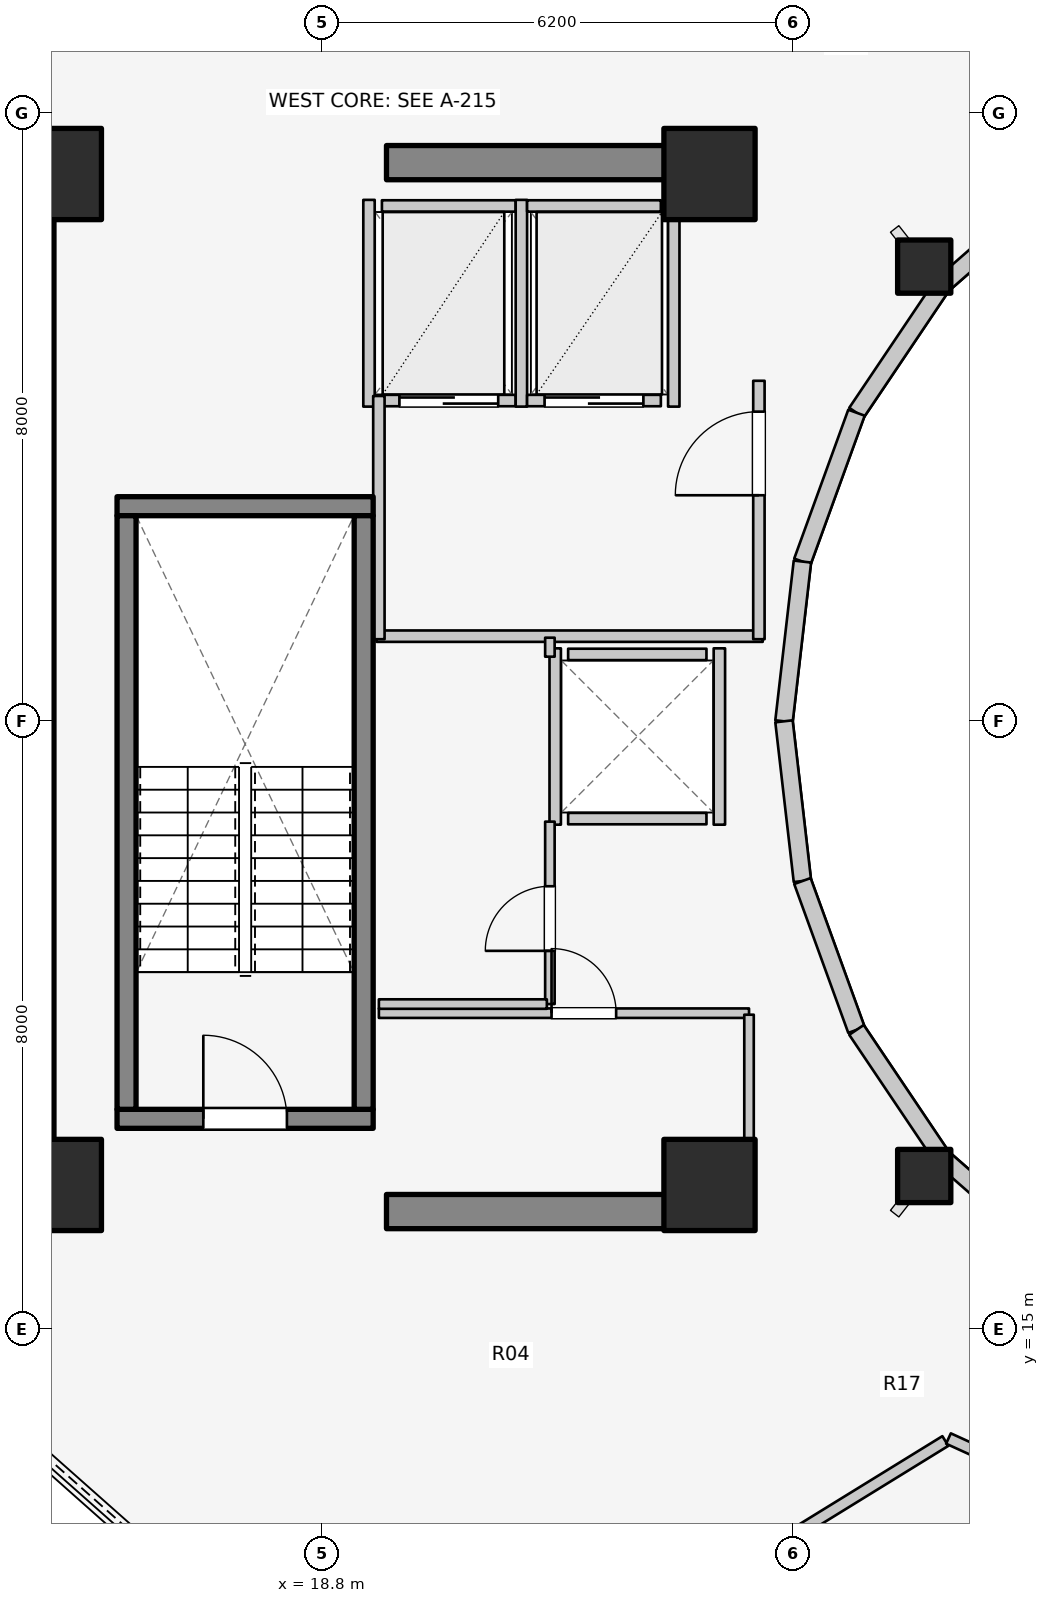
"""IFC4 building model, lengths in metres.
Left out: names, types, materials, properties, quantities, classifications, styles, units other than length and angle.
Written with IfcOpenShell. Run it as: python <this file> out.ifc"""

import sys

from ifc_helpers import new_model, si_unit, direction, frame, frame_2d, origin, origin_2d, place, context, subcontext, project, spatial, rectangle, extrude, element, fill, save


model = new_model("IFC4")
c1 = context("Model", 3, precision=1e-05, world=origin(), true_north=direction((0.0, 1.0)))
c2 = subcontext(c1, "Body", "Model", "MODEL_VIEW")
j1 = project(units=[si_unit("LENGTHUNIT", "METRE"), si_unit("PLANEANGLEUNIT", "RADIAN")], contexts=[c1])
p1 = place(None, origin())
s1 = spatial("IfcSite", under=j1, at=p1, CompositionType="ELEMENT")
p2 = place(p1, origin())
s2 = spatial("IfcBuilding", under=s1, at=p2, CompositionType="ELEMENT")
p3 = place(p2, frame((0.0, 0.0, 260.4)))
s3 = spatial("IfcBuildingStorey", under=s2, at=p3, CompositionType="ELEMENT", Elevation=260.4)
p4 = place(p3, frame((15.05, 17.05, 0.0), z_axis=(0.0, 0.0, 1.0), x_axis=(0.0, 1.0, 0.0)))
e1 = element("IfcWall", 1, at=p4, inside=s3, PredefinedType="SHEAR", context=c2, shape_type="SweptSolid", body=[
    extrude(rectangle(XDim=12.8, YDim=0.45, at=frame_2d((6.4, 0.0))), origin(), (0.0, 0.0, 1.0), 3.2),
])
for number, where, z_axis, x_axis in (
    (2, (19.65, 16.55, 0.0), (0.0, 0.0, 1.0), (1.0, 0.0, 0.0)),
    (3, (19.65, 30.35, 0.0), (0.0, 0.0, 1.0), (1.0, 0.0, 0.0)),
):
    element("IfcWall", number, at=place(p3, frame(where, z_axis=z_axis, x_axis=x_axis)), inside=s3, PredefinedType="SHEAR", context=c2, shape_type="SweptSolid", body=[
        extrude(rectangle(XDim=4.5, YDim=0.45, at=frame_2d((2.25, 0.0))), origin(), (0.0, 0.0, 1.0), 3.2),
    ])
p5 = place(p3, frame((16.105, 17.77, 0.0), z_axis=(0.0, 0.0, 1.0), x_axis=(1.0, 0.0, 0.0)))
e4 = element("IfcWall", 4, at=p5, inside=s3, PredefinedType="SOLIDWALL", context=c2, shape_type="SweptSolid", body=[
    extrude(rectangle(XDim=3.37, YDim=0.25, at=frame_2d((1.685, 0.0))), origin(), (0.0, 0.0, 1.0), 3.2),
])
p6 = place(p5, frame((1.135, 0.0, 0.0)))
e5 = element("IfcOpeningElement", 5, at=p6, cuts=e4, PredefinedType="OPENING", context=c2, shape_type="SweptSolid", body=[
    extrude(rectangle(XDim=1.1, YDim=2.1, at=frame_2d((0.55, 1.05))), frame((0.0, 0.135, 0.0), z_axis=(0.0, -1.0, 0.0), x_axis=(1.0, 0.0, 0.0)), (0.0, 0.0, 1.0), 0.27),
])
p7 = place(p3, frame((16.105, 25.83, 0.0), z_axis=(0.0, 0.0, 1.0), x_axis=(1.0, 0.0, 0.0)))
e6 = element("IfcWall", 6, at=p7, inside=s3, PredefinedType="SOLIDWALL", context=c2, shape_type="SweptSolid", body=[
    extrude(rectangle(XDim=3.37, YDim=0.25, at=frame_2d((1.685, 0.0))), origin(), (0.0, 0.0, 1.0), 3.2),
])
for number, where, z_axis, x_axis in (
    (7, (16.23, 17.895, 0.0), (0.0, 0.0, 1.0), (0.0, 1.0, 0.0)),
    (8, (19.35, 17.895, 0.0), (0.0, 0.0, 1.0), (0.0, 1.0, 0.0)),
):
    element("IfcWall", number, at=place(p3, frame(where, z_axis=z_axis, x_axis=x_axis)), inside=s3, PredefinedType="SOLIDWALL", context=c2, shape_type="SweptSolid", body=[
        extrude(rectangle(XDim=7.81, YDim=0.25, at=frame_2d((3.905, 0.0))), origin(), (0.0, 0.0, 1.0), 3.2),
    ])
for number, where, z_axis, x_axis in (
    (9, (15.3, 16.9, 0.0), (0.0, 0.0, 1.0), (1.0, 0.0, 0.0)),
    (10, (23.9, 16.9, 0.0), (0.0, 0.0, 1.0), (1.0, 0.0, 0.0)),
    (11, (23.9, 30.2, 0.0), (0.0, 0.0, 1.0), (1.0, 0.0, 0.0)),
    (12, (15.3, 30.2, 0.0), (0.0, 0.0, 1.0), (1.0, 0.0, 0.0)),
):
    element("IfcColumn", number, at=place(p3, frame(where, z_axis=z_axis, x_axis=x_axis)), inside=s3, PredefinedType="COLUMN", context=c2, shape_type="SweptSolid", body=[
        extrude(rectangle(XDim=1.2, YDim=1.2, at=origin_2d()), origin(), (0.0, 0.0, 1.0), 3.2),
    ])
for number, where, z_axis, x_axis in (
    (13, (26.725, 28.982, 0.0), (0.0, 0.0, 1.0), (1.0, 0.0, 0.0)),
    (14, (26.725, 17.018, 0.0), (0.0, 0.0, 1.0), (1.0, 0.0, 0.0)),
):
    element("IfcColumn", number, at=place(p3, frame(where, z_axis=z_axis, x_axis=x_axis)), inside=s3, PredefinedType="COLUMN", context=c2, shape_type="SweptSolid", body=[
        extrude(rectangle(XDim=0.7, YDim=0.7, at=origin_2d()), origin(), (0.0, 0.0, 1.0), 3.2),
    ])
p8 = place(p3, frame((28.44, 30.032, 0.0), z_axis=(0.0, 0.0, 1.0), x_axis=(-0.752576694707, -0.658504607869, 0.0)))
e15 = element("IfcWall", 15, at=p8, inside=s3, PredefinedType="STANDARD", context=c2, shape_type="SweptSolid", body=[
    extrude(rectangle(XDim=1.959, YDim=0.23, at=frame_2d((0.98, 0.0))), origin(), (0.0, 0.0, 1.0), 1.32),
])
p9 = place(p3, frame((26.965, 28.742, 0.0), z_axis=(0.0, 0.0, 1.0), x_axis=(-0.558197800898, -0.829707909492, 0.0)))
e16 = element("IfcWall", 16, at=p9, inside=s3, PredefinedType="STANDARD", context=c2, shape_type="SweptSolid", body=[
    extrude(rectangle(XDim=2.027, YDim=0.23, at=frame_2d((1.013, 0.0))), origin(), (0.0, 0.0, 1.0), 1.32),
])
p10 = place(p3, frame((25.834, 27.06, 0.0), z_axis=(0.0, 0.0, 1.0), x_axis=(-0.341423187295, -0.93990968033, 0.0)))
e17 = element("IfcWall", 17, at=p10, inside=s3, PredefinedType="STANDARD", context=c2, shape_type="SweptSolid", body=[
    extrude(rectangle(XDim=2.084, YDim=0.23, at=frame_2d((1.042, 0.0))), origin(), (0.0, 0.0, 1.0), 2.9),
])
for number, where, z_axis, x_axis in (
    (18, (25.123, 25.102, 0.0), (0.0, 0.0, 1.0), (-0.115, -0.993, 0.0)),
    (19, (24.88, 23.0, 0.0), (0.0, 0.0, 1.0), (0.115, -0.993, 0.0)),
):
    element("IfcWall", number, at=place(p3, frame(where, z_axis=z_axis, x_axis=x_axis)), inside=s3, PredefinedType="STANDARD", context=c2, shape_type="SweptSolid", body=[
        extrude(rectangle(XDim=2.115, YDim=0.23, at=frame_2d((1.058, 0.0))), origin(), (0.0, 0.0, 1.0), 2.9),
    ])
p11 = place(p3, frame((25.123, 20.898, 0.0), z_axis=(0.0, 0.0, 1.0), x_axis=(0.341423187295, -0.93990968033, 0.0)))
e20 = element("IfcWall", 20, at=p11, inside=s3, PredefinedType="STANDARD", context=c2, shape_type="SweptSolid", body=[
    extrude(rectangle(XDim=2.084, YDim=0.23, at=frame_2d((1.042, 0.0))), origin(), (0.0, 0.0, 1.0), 2.9),
])
p12 = place(p3, frame((25.834, 18.94, 0.0), z_axis=(0.0, 0.0, 1.0), x_axis=(0.558197800898, -0.829707909492, 0.0)))
e21 = element("IfcWall", 21, at=p12, inside=s3, PredefinedType="STANDARD", context=c2, shape_type="SweptSolid", body=[
    extrude(rectangle(XDim=2.027, YDim=0.23, at=frame_2d((1.013, 0.0))), origin(), (0.0, 0.0, 1.0), 1.32),
])
p13 = place(p3, frame((26.965, 17.258, 0.0), z_axis=(0.0, 0.0, 1.0), x_axis=(0.752576694707, -0.658504607869, 0.0)))
e22 = element("IfcWall", 22, at=p13, inside=s3, PredefinedType="STANDARD", context=c2, shape_type="SweptSolid", body=[
    extrude(rectangle(XDim=1.959, YDim=0.23, at=frame_2d((0.98, 0.0))), origin(), (0.0, 0.0, 1.0), 1.32),
])
p14 = place(p3, frame((17.154, 34.43, 0.0), z_axis=(0.0, 0.0, 1.0), x_axis=(-0.74835503106, -0.663298384958, 0.0)))
e23 = element("IfcWall", 23, at=p14, inside=s3, PredefinedType="STANDARD", context=c2, shape_type="SweptSolid", body=[
    extrude(rectangle(XDim=4.084, YDim=0.26, at=frame_2d((2.042, 0.0))), origin(), (0.0, 0.0, 1.0), 1.32),
])
for number, where, z_axis, x_axis in (
    (24, (22.04, 21.72, 0.0), (0.0, 0.0, 1.0), (1.0, 0.0, 0.0)),
    (25, (22.04, 23.88, 0.0), (0.0, 0.0, 1.0), (1.0, 0.0, 0.0)),
):
    element("IfcWall", number, at=place(p3, frame(where, z_axis=z_axis, x_axis=x_axis)), inside=s3, PredefinedType="SOLIDWALL", context=c2, shape_type="SweptSolid", body=[
        extrude(rectangle(XDim=1.82, YDim=0.15, at=frame_2d((0.91, 0.0))), origin(), (0.0, 0.0, 1.0), 2.22),
    ])
p15 = place(p3, frame((21.87, 21.64, 0.0), z_axis=(0.0, 0.0, 1.0), x_axis=(0.0, 1.0, 0.0)))
e26 = element("IfcWall", 26, at=p15, inside=s3, PredefinedType="SOLIDWALL", context=c2, shape_type="SweptSolid", body=[
    extrude(rectangle(XDim=2.32, YDim=0.15, at=frame_2d((1.16, 0.0))), origin(), (0.0, 0.0, 1.0), 2.915),
])
p16 = place(p3, frame((24.03, 21.64, 0.0), z_axis=(0.0, 0.0, 1.0), x_axis=(0.0, 1.0, 0.0)))
e27 = element("IfcWall", 27, at=p16, inside=s3, PredefinedType="SOLIDWALL", context=c2, shape_type="SweptSolid", body=[
    extrude(rectangle(XDim=2.32, YDim=0.15, at=frame_2d((1.16, 0.0))), origin(), (0.0, 0.0, 1.0), 2.22),
])
p17 = place(p3, frame((19.59, 27.22, 0.0), z_axis=(0.0, 0.0, 1.0), x_axis=(1.0, 0.0, 0.0)))
e28 = element("IfcWall", 28, at=p17, inside=s3, PredefinedType="SOLIDWALL", context=c2, shape_type="SweptSolid", body=[
    extrude(rectangle(XDim=1.76, YDim=0.15, at=frame_2d((0.88, 0.0))), origin(), (0.0, 0.0, 1.0), 2.915),
])
p18 = place(p17, frame((0.23, 0.0, 0.0)))
e29 = element("IfcOpeningElement", 29, at=p18, cuts=e28, PredefinedType="OPENING", context=c2, shape_type="SweptSolid", body=[
    extrude(rectangle(XDim=1.3, YDim=2.1, at=frame_2d((0.65, 1.05))), frame((0.0, 0.085, 0.0), z_axis=(0.0, -1.0, 0.0), x_axis=(1.0, 0.0, 0.0)), (0.0, 0.0, 1.0), 0.17),
])
p19 = place(p3, frame((19.59, 29.78, 0.0), z_axis=(0.0, 0.0, 1.0), x_axis=(1.0, 0.0, 0.0)))
e30 = element("IfcWall", 30, at=p19, inside=s3, PredefinedType="SOLIDWALL", context=c2, shape_type="SweptSolid", body=[
    extrude(rectangle(XDim=1.76, YDim=0.15, at=frame_2d((0.88, 0.0))), origin(), (0.0, 0.0, 1.0), 2.915),
])
for number, where, z_axis, x_axis in (
    (31, (19.42, 27.14, 0.0), (0.0, 0.0, 1.0), (0.0, 1.0, 0.0)),
    (32, (21.425, 27.14, 0.0), (0.0, 0.0, 1.0), (0.0, 1.0, 0.0)),
):
    element("IfcWall", number, at=place(p3, frame(where, z_axis=z_axis, x_axis=x_axis)), inside=s3, PredefinedType="SOLIDWALL", context=c2, shape_type="SweptSolid", body=[
        extrude(rectangle(XDim=2.72, YDim=0.15, at=frame_2d((1.36, 0.0))), origin(), (0.0, 0.0, 1.0), 2.915),
    ])
p20 = place(p3, frame((21.5, 27.22, 0.0), z_axis=(0.0, 0.0, 1.0), x_axis=(1.0, 0.0, 0.0)))
e33 = element("IfcWall", 33, at=p20, inside=s3, PredefinedType="SOLIDWALL", context=c2, shape_type="SweptSolid", body=[
    extrude(rectangle(XDim=1.76, YDim=0.15, at=frame_2d((0.88, 0.0))), origin(), (0.0, 0.0, 1.0), 2.915),
])
p21 = place(p20, frame((0.23, 0.0, 0.0)))
e34 = element("IfcOpeningElement", 34, at=p21, cuts=e33, PredefinedType="OPENING", context=c2, shape_type="SweptSolid", body=[
    extrude(rectangle(XDim=1.3, YDim=2.1, at=frame_2d((0.65, 1.05))), frame((0.0, 0.085, 0.0), z_axis=(0.0, -1.0, 0.0), x_axis=(1.0, 0.0, 0.0)), (0.0, 0.0, 1.0), 0.17),
])
p22 = place(p3, frame((21.5, 29.78, 0.0), z_axis=(0.0, 0.0, 1.0), x_axis=(1.0, 0.0, 0.0)))
e35 = element("IfcWall", 35, at=p22, inside=s3, PredefinedType="SOLIDWALL", context=c2, shape_type="SweptSolid", body=[
    extrude(rectangle(XDim=1.76, YDim=0.15, at=frame_2d((0.88, 0.0))), origin(), (0.0, 0.0, 1.0), 2.915),
])
p23 = place(p3, frame((23.43, 27.14, 0.0), z_axis=(0.0, 0.0, 1.0), x_axis=(0.0, 1.0, 0.0)))
e36 = element("IfcWall", 36, at=p23, inside=s3, PredefinedType="SOLIDWALL", context=c2, shape_type="SweptSolid", body=[
    extrude(rectangle(XDim=2.72, YDim=0.15, at=frame_2d((1.36, 0.0))), origin(), (0.0, 0.0, 1.0), 2.915),
])
p24 = place(p3, frame((19.52, 24.12, 0.0), z_axis=(0.0, 0.0, 1.0), x_axis=(1.0, 0.0, 0.0)))
e37 = element("IfcWall", 37, at=p24, inside=s3, PredefinedType="PARTITIONING", context=c2, shape_type="SweptSolid", body=[
    extrude(rectangle(XDim=5.08, YDim=0.15, at=frame_2d((2.54, 0.0))), origin(), (0.0, 0.0, 1.0), 2.22),
])
p25 = place(p3, frame((19.55, 24.08, 0.0), z_axis=(0.0, 0.0, 1.0), x_axis=(0.0, 1.0, 0.0)))
e38 = element("IfcWall", 38, at=p25, inside=s3, PredefinedType="PARTITIONING", context=c2, shape_type="SweptSolid", body=[
    extrude(rectangle(XDim=3.2, YDim=0.15, at=frame_2d((1.6, 0.0))), origin(), (0.0, 0.0, 1.0), 2.915),
])
p26 = place(p3, frame((24.55, 24.08, 0.0), z_axis=(0.0, 0.0, 1.0), x_axis=(0.0, 1.0, 0.0)))
e39 = element("IfcWall", 39, at=p26, inside=s3, PredefinedType="PARTITIONING", context=c2, shape_type="SweptSolid", body=[
    extrude(rectangle(XDim=3.4, YDim=0.15, at=frame_2d((1.7, 0.0))), origin(), (0.0, 0.0, 1.0), 2.915),
])
p27 = place(p26, frame((1.894, 0.0, 0.0)))
e40 = element("IfcOpeningElement", 40, at=p27, cuts=e39, PredefinedType="OPENING", context=c2, shape_type="SweptSolid", body=[
    extrude(rectangle(XDim=1.1, YDim=2.1, at=frame_2d((0.55, 1.05))), frame((0.0, 0.085, 0.0), z_axis=(0.0, -1.0, 0.0), x_axis=(1.0, 0.0, 0.0)), (0.0, 0.0, 1.0), 0.17),
])
p28 = place(p3, frame((19.55, 19.16, 0.0), z_axis=(0.0, 0.0, 1.0), x_axis=(1.0, 0.0, 0.0)))
e41 = element("IfcWall", 41, at=p28, inside=s3, PredefinedType="PARTITIONING", context=c2, shape_type="SweptSolid", body=[
    extrude(rectangle(XDim=4.87, YDim=0.125, at=frame_2d((2.435, 0.0))), origin(), (0.0, 0.0, 1.0), 2.22),
])
p29 = place(p28, frame((2.272, 0.0, 0.0)))
e42 = element("IfcOpeningElement", 42, at=p29, cuts=e41, PredefinedType="OPENING", context=c2, shape_type="SweptSolid", body=[
    extrude(rectangle(XDim=0.85, YDim=2.05, at=frame_2d((0.425, 1.025))), frame((0.0, 0.073, 0.0), z_axis=(0.0, -1.0, 0.0), x_axis=(1.0, 0.0, 0.0)), (0.0, 0.0, 1.0), 0.145),
])
p30 = place(p3, frame((24.42, 17.1, 0.0), z_axis=(0.0, 0.0, 1.0), x_axis=(0.0, 1.0, 0.0)))
e43 = element("IfcWall", 43, at=p30, inside=s3, PredefinedType="PARTITIONING", context=c2, shape_type="SweptSolid", body=[
    extrude(rectangle(XDim=2.04, YDim=0.125, at=frame_2d((1.02, 0.0))), origin(), (0.0, 0.0, 1.0), 2.491),
])
p31 = place(p3, frame((21.8, 19.28, 0.0), z_axis=(0.0, 0.0, 1.0), x_axis=(0.0, 1.0, 0.0)))
e44 = element("IfcWall", 44, at=p31, inside=s3, PredefinedType="PARTITIONING", context=c2, shape_type="SweptSolid", body=[
    extrude(rectangle(XDim=2.4, YDim=0.125, at=frame_2d((1.2, 0.0))), origin(), (0.0, 0.0, 1.0), 2.915),
])
p32 = place(p31, frame((0.7, 0.0, 0.0)))
e45 = element("IfcOpeningElement", 45, at=p32, cuts=e44, PredefinedType="OPENING", context=c2, shape_type="SweptSolid", body=[
    extrude(rectangle(XDim=0.85, YDim=2.05, at=frame_2d((0.425, 1.025))), frame((0.0, 0.073, 0.0), z_axis=(0.0, -1.0, 0.0), x_axis=(1.0, 0.0, 0.0)), (0.0, 0.0, 1.0), 0.145),
])
p33 = place(p3, frame((21.8, 23.85, 0.0), z_axis=(0.0, 0.0, 1.0), x_axis=(0.0, 1.0, 0.0)))
e46 = element("IfcWall", 46, at=p33, inside=s3, PredefinedType="PARTITIONING", context=c2, shape_type="SweptSolid", body=[
    extrude(rectangle(XDim=0.25, YDim=0.125, at=frame_2d((0.125, 0.0))), origin(), (0.0, 0.0, 1.0), 2.915),
])
p34 = place(p3, frame((19.55, 19.28, 0.0), z_axis=(0.0, 0.0, 1.0), x_axis=(1.0, 0.0, 0.0)))
e47 = element("IfcWall", 47, at=p34, inside=s3, PredefinedType="PARTITIONING", context=c2, shape_type="SweptSolid", body=[
    extrude(rectangle(XDim=2.21, YDim=0.125, at=frame_2d((1.105, 0.0))), origin(), (0.0, 0.0, 1.0), 2.22),
])
p35 = place(p3, frame((27.003, 13.531, 0.0), z_axis=(0.0, 0.0, 1.0), x_axis=(-0.851425368576, -0.524475778035, 0.0)))
e48 = element("IfcWall", 48, at=p35, inside=s3, PredefinedType="PARTITIONING", context=c2, shape_type="SweptSolid", body=[
    extrude(rectangle(XDim=6.948, YDim=0.15, at=frame_2d((3.474, 0.0))), origin(), (0.0, 0.0, 1.0), 1.32),
])
p36 = place(p3, frame((27.044, 13.564, 0.0), z_axis=(0.0, 0.0, 1.0), x_axis=(0.909736731002, -0.415185597373, 0.0)))
e49 = element("IfcWall", 49, at=p36, inside=s3, PredefinedType="PARTITIONING", context=c2, shape_type="SweptSolid", body=[
    extrude(rectangle(XDim=2.633, YDim=0.15, at=frame_2d((1.317, 0.0))), origin(), (0.0, 0.0, 1.0), 1.32),
])
p37 = place(p6, origin())
e50 = element("IfcDoor", 50, at=p37, inside=s3, OperationType="SINGLE_SWING_LEFT", PredefinedType="DOOR", context=c2, shape_type="SweptSolid", body=[
    extrude(rectangle(XDim=1.1, YDim=2.1, at=frame_2d((0.55, 1.05))), frame((0.0, 0.025, 0.0), z_axis=(0.0, -1.0, 0.0), x_axis=(1.0, 0.0, 0.0)), (0.0, 0.0, 1.0), 0.05),
])
fill(e5, e50)
p38 = place(p18, origin())
e51 = element("IfcDoor", 51, at=p38, inside=s3, OperationType="DOUBLE_DOOR_SLIDING", PredefinedType="DOOR", context=c2, shape_type="SweptSolid", body=[
    extrude(rectangle(XDim=1.3, YDim=2.1, at=frame_2d((0.65, 1.05))), frame((0.0, 0.025, 0.0), z_axis=(0.0, -1.0, 0.0), x_axis=(1.0, 0.0, 0.0)), (0.0, 0.0, 1.0), 0.05),
])
fill(e29, e51)
p39 = place(p21, origin())
e52 = element("IfcDoor", 52, at=p39, inside=s3, OperationType="DOUBLE_DOOR_SLIDING", PredefinedType="DOOR", context=c2, shape_type="SweptSolid", body=[
    extrude(rectangle(XDim=1.3, YDim=2.1, at=frame_2d((0.65, 1.05))), frame((0.0, 0.025, 0.0), z_axis=(0.0, -1.0, 0.0), x_axis=(1.0, 0.0, 0.0)), (0.0, 0.0, 1.0), 0.05),
])
fill(e34, e52)
p40 = place(p27, origin())
e53 = element("IfcDoor", 53, at=p40, inside=s3, OperationType="SINGLE_SWING_LEFT", PredefinedType="DOOR", context=c2, shape_type="SweptSolid", body=[
    extrude(rectangle(XDim=1.1, YDim=2.1, at=frame_2d((0.55, 1.05))), frame((0.0, 0.025, 0.0), z_axis=(0.0, -1.0, 0.0), x_axis=(1.0, 0.0, 0.0)), (0.0, 0.0, 1.0), 0.05),
])
fill(e40, e53)
p41 = place(p29, origin())
e54 = element("IfcDoor", 54, at=p41, inside=s3, OperationType="SINGLE_SWING_LEFT", PredefinedType="DOOR", context=c2, shape_type="SweptSolid", body=[
    extrude(rectangle(XDim=0.85, YDim=2.05, at=frame_2d((0.425, 1.025))), frame((0.0, 0.025, 0.0), z_axis=(0.0, -1.0, 0.0), x_axis=(1.0, 0.0, 0.0)), (0.0, 0.0, 1.0), 0.05),
])
fill(e42, e54)
p42 = place(p32, origin())
e55 = element("IfcDoor", 55, at=p42, inside=s3, OperationType="SINGLE_SWING_LEFT", PredefinedType="DOOR", context=c2, shape_type="SweptSolid", body=[
    extrude(rectangle(XDim=0.85, YDim=2.05, at=frame_2d((0.425, 1.025))), frame((0.0, 0.025, 0.0), z_axis=(0.0, -1.0, 0.0), x_axis=(1.0, 0.0, 0.0)), (0.0, 0.0, 1.0), 0.05),
])
fill(e45, e55)
save(model, sys.argv[1])
